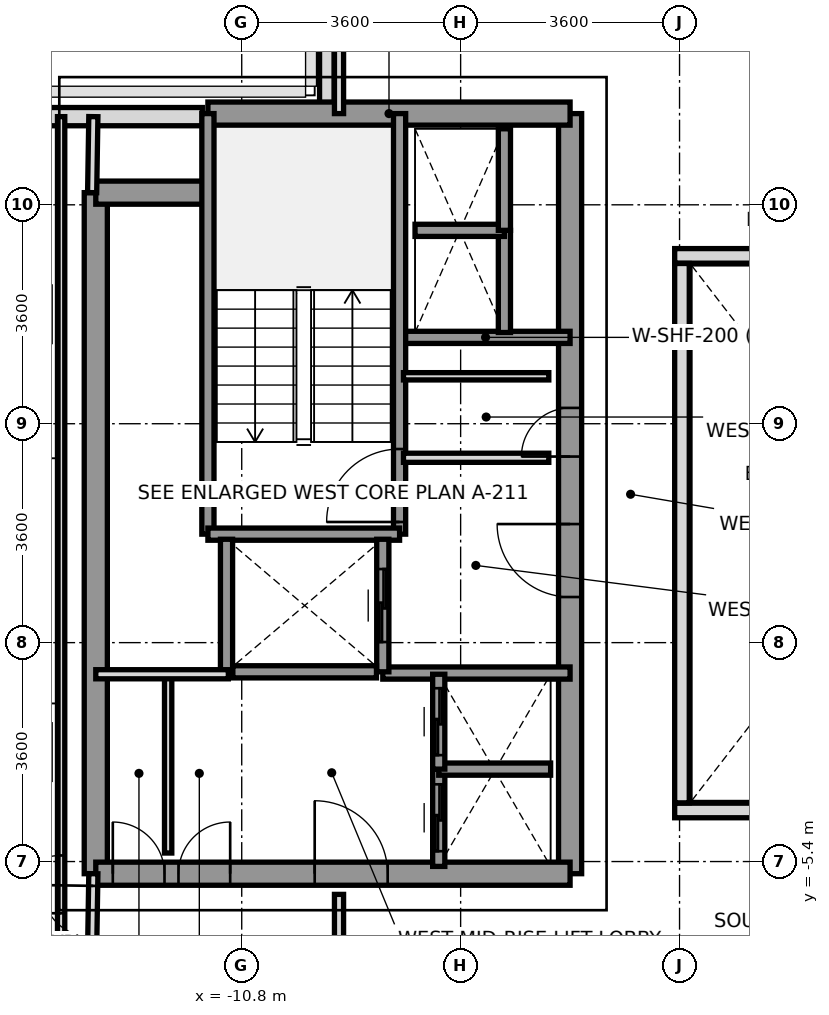
"""IFC4 building model, lengths in metres.
Left out: names, types, materials, properties, quantities, classifications, styles, units other than length and angle.
Written with IfcOpenShell. Run it as: python <this file> out.ifc"""

import sys

from ifc_helpers import new_model, si_unit, direction, frame, frame_2d, origin, place, context, subcontext, project, spatial, rectangle, extrude, source, transform, mapped, element, fill, save


model = new_model("IFC4")
c1 = context("Model", 3, precision=1e-05, world=origin(), true_north=direction((0.0, 1.0)))
c2 = subcontext(c1, "Body", "Model", "MODEL_VIEW")
j1 = project(units=[si_unit("LENGTHUNIT", "METRE"), si_unit("PLANEANGLEUNIT", "RADIAN")], contexts=[c1])
p1 = place(None, origin())
s1 = spatial("IfcSite", under=j1, at=p1, CompositionType="ELEMENT")
p2 = place(p1, origin())
s2 = spatial("IfcBuilding", under=s1, at=p2, CompositionType="ELEMENT")
p3 = place(p2, frame((0.0, 0.0, 160.4)))
s3 = spatial("IfcBuildingStorey", under=s2, at=p3, CompositionType="ELEMENT", Elevation=160.4)
p4 = place(p3, frame((-14.083, 6.85, 0.0), z_axis=(0.0, 0.0, 1.0), x_axis=(1.0, 0.0, 0.0)))
e1 = element("IfcWall", 1, at=p4, inside=s3, PredefinedType="SOLIDWALL", context=c2, shape_type="SweptSolid", body=[
    extrude(rectangle(XDim=2.635, YDim=0.3, at=frame_2d((1.317, 0.0))), origin(), (0.0, 0.0, 1.0), 3.2),
])
p5 = place(p3, frame((-9.4, 6.953, 0.0), z_axis=(0.0, 0.0, 1.0), x_axis=(0.0, 1.0, 0.0)))
e2 = element("IfcWall", 2, at=p5, inside=s3, PredefinedType="PARAPET", context=c2, shape_type="SweptSolid", body=[
    extrude(rectangle(XDim=1.594, YDim=0.24, at=frame_2d((0.797, 0.0))), origin(), (0.0, 0.0, 1.0), 1.15),
])
p6 = place(p3, frame((-13.2, -5.6, 0.0), z_axis=(0.0, 0.0, 1.0), x_axis=(0.0, 1.0, 0.0)))
e3 = element("IfcWall", 3, at=p6, inside=s3, PredefinedType="SHEAR", context=c2, shape_type="SweptSolid", body=[
    extrude(rectangle(XDim=11.2, YDim=0.38, at=frame_2d((5.6, 0.0))), origin(), (0.0, 0.0, 1.0), 3.2),
])
p7 = place(p3, frame((-5.4, -5.6, 0.0), z_axis=(0.0, 0.0, 1.0), x_axis=(0.0, 1.0, 0.0)))
e4 = element("IfcWall", 4, at=p7, inside=s3, PredefinedType="SHEAR", context=c2, shape_type="SweptSolid", body=[
    extrude(rectangle(XDim=12.5, YDim=0.38, at=frame_2d((6.25, 0.0))), origin(), (0.0, 0.0, 1.0), 3.2),
])
p8 = place(p7, frame((4.55, 0.0, 0.0)))
e5 = element("IfcOpeningElement", 5, at=p8, cuts=e4, PredefinedType="OPENING", context=c2, shape_type="SweptSolid", body=[
    extrude(rectangle(XDim=1.2, YDim=2.2, at=frame_2d((0.6, 1.1))), frame((0.0, 0.2, 0.0), z_axis=(0.0, -1.0, 0.0), x_axis=(1.0, 0.0, 0.0)), (0.0, 0.0, 1.0), 0.4),
])
p9 = place(p7, frame((6.86, 0.0, 0.0)))
e6 = element("IfcOpeningElement", 6, at=p9, cuts=e4, PredefinedType="OPENING", context=c2, shape_type="SweptSolid", body=[
    extrude(rectangle(XDim=0.8, YDim=2.1, at=frame_2d((0.4, 1.05))), frame((0.0, 0.2, 0.0), z_axis=(0.0, -1.0, 0.0), x_axis=(1.0, 0.0, 0.0)), (0.0, 0.0, 1.0), 0.4),
])
p10 = place(p3, frame((-11.356, 6.9, 0.0), z_axis=(0.0, 0.0, 1.0), x_axis=(1.0, 0.0, 0.0)))
e7 = element("IfcWall", 7, at=p10, inside=s3, PredefinedType="SHEAR", context=c2, shape_type="SweptSolid", body=[
    extrude(rectangle(XDim=5.956, YDim=0.38, at=frame_2d((2.978, 0.0))), origin(), (0.0, 0.0, 1.0), 3.2),
])
p11 = place(p3, frame((-13.2, 5.6, 0.0), z_axis=(0.0, 0.0, 1.0), x_axis=(1.0, 0.0, 0.0)))
e8 = element("IfcWall", 8, at=p11, inside=s3, PredefinedType="SHEAR", context=c2, shape_type="SweptSolid", body=[
    extrude(rectangle(XDim=1.844, YDim=0.38, at=frame_2d((0.922, 0.0))), origin(), (0.0, 0.0, 1.0), 3.2),
])
p12 = place(p3, frame((-13.2, -5.6, 0.0), z_axis=(0.0, 0.0, 1.0), x_axis=(1.0, 0.0, 0.0)))
e9 = element("IfcWall", 9, at=p12, inside=s3, PredefinedType="SHEAR", context=c2, shape_type="SweptSolid", body=[
    extrude(rectangle(XDim=7.8, YDim=0.38, at=frame_2d((3.9, 0.0))), origin(), (0.0, 0.0, 1.0), 3.2),
])
p13 = place(p12, frame((3.6, 0.0, 0.0)))
e10 = element("IfcOpeningElement", 10, at=p13, cuts=e9, PredefinedType="OPENING", context=c2, shape_type="SweptSolid", body=[
    extrude(rectangle(XDim=1.2, YDim=2.2, at=frame_2d((0.6, 1.1))), frame((0.0, 0.2, 0.0), z_axis=(0.0, -1.0, 0.0), x_axis=(1.0, 0.0, 0.0)), (0.0, 0.0, 1.0), 0.4),
])
p14 = place(p12, frame((0.28, 0.0, 0.0)))
e11 = element("IfcOpeningElement", 11, at=p14, cuts=e9, PredefinedType="OPENING", context=c2, shape_type="SweptSolid", body=[
    extrude(rectangle(XDim=0.85, YDim=2.1, at=frame_2d((0.425, 1.05))), frame((0.0, 0.2, 0.0), z_axis=(0.0, -1.0, 0.0), x_axis=(1.0, 0.0, 0.0)), (0.0, 0.0, 1.0), 0.4),
])
p15 = place(p12, frame((1.36, 0.0, 0.0)))
e12 = element("IfcOpeningElement", 12, at=p15, cuts=e9, PredefinedType="OPENING", context=c2, shape_type="SweptSolid", body=[
    extrude(rectangle(XDim=0.85, YDim=2.1, at=frame_2d((0.425, 1.05))), frame((0.0, 0.2, 0.0), z_axis=(0.0, -1.0, 0.0), x_axis=(1.0, 0.0, 0.0)), (0.0, 0.0, 1.0), 0.4),
])
p16 = place(p3, frame((-8.18, 3.22, 0.0), z_axis=(0.0, 0.0, 1.0), x_axis=(1.0, 0.0, 0.0)))
e13 = element("IfcWall", 13, at=p16, inside=s3, PredefinedType="SOLIDWALL", context=c2, shape_type="SweptSolid", body=[
    extrude(rectangle(XDim=2.78, YDim=0.2, at=frame_2d((1.39, 0.0))), origin(), (0.0, 0.0, 1.0), 3.2),
])
p17 = place(p3, frame((-8.48, -2.3, 0.0), z_axis=(0.0, 0.0, 1.0), x_axis=(1.0, 0.0, 0.0)))
e14 = element("IfcWall", 14, at=p17, inside=s3, PredefinedType="SOLIDWALL", context=c2, shape_type="SweptSolid", body=[
    extrude(rectangle(XDim=3.08, YDim=0.2, at=frame_2d((1.54, 0.0))), origin(), (0.0, 0.0, 1.0), 3.2),
])
p18 = place(p3, frame((-8.204, -0.016, 0.0), z_axis=(0.0, 0.0, 1.0), x_axis=(0.0, 1.0, 0.0)))
e15 = element("IfcWall", 15, at=p18, inside=s3, PredefinedType="SOLIDWALL", context=c2, shape_type="SweptSolid", body=[
    extrude(rectangle(XDim=6.916, YDim=0.2, at=frame_2d((3.458, 0.0))), origin(), (0.0, 0.0, 1.0), 3.2),
])
p19 = place(p18, frame((0.2, 0.0, 0.0)))
e16 = element("IfcOpeningElement", 16, at=p19, cuts=e15, PredefinedType="OPENING", context=c2, shape_type="SweptSolid", body=[
    extrude(rectangle(XDim=1.2, YDim=2.2, at=frame_2d((0.6, 1.1))), frame((0.0, 0.11, 0.0), z_axis=(0.0, -1.0, 0.0), x_axis=(1.0, 0.0, 0.0)), (0.0, 0.0, 1.0), 0.22),
])
p20 = place(p3, frame((-11.356, -0.016, 0.0), z_axis=(0.0, 0.0, 1.0), x_axis=(0.0, 1.0, 0.0)))
e17 = element("IfcWall", 17, at=p20, inside=s3, PredefinedType="SOLIDWALL", context=c2, shape_type="SweptSolid", body=[
    extrude(rectangle(XDim=6.916, YDim=0.2, at=frame_2d((3.458, 0.0))), origin(), (0.0, 0.0, 1.0), 3.2),
])
p21 = place(p3, frame((-11.356, -0.016, 0.0), z_axis=(0.0, 0.0, 1.0), x_axis=(1.0, 0.0, 0.0)))
e18 = element("IfcWall", 18, at=p21, inside=s3, PredefinedType="SOLIDWALL", context=c2, shape_type="SweptSolid", body=[
    extrude(rectangle(XDim=3.152, YDim=0.2, at=frame_2d((1.576, 0.0))), origin(), (0.0, 0.0, 1.0), 3.2),
])
p22 = place(p3, frame((-11.05, -2.28, 0.0), z_axis=(0.0, 0.0, 1.0), x_axis=(0.0, 1.0, 0.0)))
e19 = element("IfcWall", 19, at=p22, inside=s3, PredefinedType="SOLIDWALL", context=c2, shape_type="SweptSolid", body=[
    extrude(rectangle(XDim=2.18, YDim=0.2, at=frame_2d((1.09, 0.0))), origin(), (0.0, 0.0, 1.0), 3.2),
])
p23 = place(p3, frame((-8.48, -2.28, 0.0), z_axis=(0.0, 0.0, 1.0), x_axis=(0.0, 1.0, 0.0)))
e20 = element("IfcWall", 20, at=p23, inside=s3, PredefinedType="SOLIDWALL", context=c2, shape_type="SweptSolid", body=[
    extrude(rectangle(XDim=2.18, YDim=0.2, at=frame_2d((1.09, 0.0))), origin(), (0.0, 0.0, 1.0), 3.2),
])
p24 = place(p23, frame((0.49, 0.0, 0.0)))
e21 = element("IfcOpeningElement", 21, at=p24, cuts=e20, PredefinedType="OPENING", context=c2, shape_type="SweptSolid", body=[
    extrude(rectangle(XDim=1.2, YDim=2.2, at=frame_2d((0.6, 1.1))), frame((0.0, 0.11, 0.0), z_axis=(0.0, -1.0, 0.0), x_axis=(1.0, 0.0, 0.0)), (0.0, 0.0, 1.0), 0.22),
])
p25 = place(p3, frame((-10.946, -2.28, 0.0), z_axis=(0.0, 0.0, 1.0), x_axis=(1.0, 0.0, 0.0)))
e22 = element("IfcWall", 22, at=p25, inside=s3, PredefinedType="SOLIDWALL", context=c2, shape_type="SweptSolid", body=[
    extrude(rectangle(XDim=2.362, YDim=0.2, at=frame_2d((1.181, 0.0))), origin(), (0.0, 0.0, 1.0), 3.2),
])
p26 = place(p3, frame((-7.56, -5.48, 0.0), z_axis=(0.0, 0.0, 1.0), x_axis=(0.0, 1.0, 0.0)))
e23 = element("IfcWall", 23, at=p26, inside=s3, PredefinedType="SOLIDWALL", context=c2, shape_type="SweptSolid", body=[
    extrude(rectangle(XDim=1.6, YDim=0.2, at=frame_2d((0.8, 0.0))), origin(), (0.0, 0.0, 1.0), 3.2),
])
p27 = place(p26, frame((0.25, 0.0, 0.0)))
e24 = element("IfcOpeningElement", 24, at=p27, cuts=e23, PredefinedType="OPENING", context=c2, shape_type="SweptSolid", body=[
    extrude(rectangle(XDim=1.1, YDim=2.2, at=frame_2d((0.55, 1.1))), frame((0.0, 0.11, 0.0), z_axis=(0.0, -1.0, 0.0), x_axis=(1.0, 0.0, 0.0)), (0.0, 0.0, 1.0), 0.22),
])
p28 = place(p3, frame((-7.56, -3.88, 0.0), z_axis=(0.0, 0.0, 1.0), x_axis=(1.0, 0.0, 0.0)))
e25 = element("IfcWall", 25, at=p28, inside=s3, PredefinedType="SOLIDWALL", context=c2, shape_type="SweptSolid", body=[
    extrude(rectangle(XDim=1.84, YDim=0.2, at=frame_2d((0.92, 0.0))), origin(), (0.0, 0.0, 1.0), 3.2),
])
p29 = place(p3, frame((-7.56, -3.88, 0.0), z_axis=(0.0, 0.0, 1.0), x_axis=(0.0, 1.0, 0.0)))
e26 = element("IfcWall", 26, at=p29, inside=s3, PredefinedType="SOLIDWALL", context=c2, shape_type="SweptSolid", body=[
    extrude(rectangle(XDim=1.56, YDim=0.2, at=frame_2d((0.78, 0.0))), origin(), (0.0, 0.0, 1.0), 3.2),
])
p30 = place(p29, frame((0.23, 0.0, 0.0)))
e27 = element("IfcOpeningElement", 27, at=p30, cuts=e26, PredefinedType="OPENING", context=c2, shape_type="SweptSolid", body=[
    extrude(rectangle(XDim=1.1, YDim=2.2, at=frame_2d((0.55, 1.1))), frame((0.0, 0.11, 0.0), z_axis=(0.0, -1.0, 0.0), x_axis=(1.0, 0.0, 0.0)), (0.0, 0.0, 1.0), 0.22),
])
p31 = place(p3, frame((-6.48, 3.3, 0.0), z_axis=(0.0, 0.0, 1.0), x_axis=(0.0, 1.0, 0.0)))
e28 = element("IfcWall", 28, at=p31, inside=s3, PredefinedType="SOLIDWALL", context=c2, shape_type="SweptSolid", body=[
    extrude(rectangle(XDim=1.68, YDim=0.2, at=frame_2d((0.84, 0.0))), origin(), (0.0, 0.0, 1.0), 3.2),
])
p32 = place(p3, frame((-7.95, 4.98, 0.0), z_axis=(0.0, 0.0, 1.0), x_axis=(1.0, 0.0, 0.0)))
e29 = element("IfcWall", 29, at=p32, inside=s3, PredefinedType="SOLIDWALL", context=c2, shape_type="SweptSolid", body=[
    extrude(rectangle(XDim=1.47, YDim=0.2, at=frame_2d((0.735, 0.0))), origin(), (0.0, 0.0, 1.0), 3.2),
])
p33 = place(p3, frame((-6.48, 4.98, 0.0), z_axis=(0.0, 0.0, 1.0), x_axis=(0.0, 1.0, 0.0)))
e30 = element("IfcWall", 30, at=p33, inside=s3, PredefinedType="SOLIDWALL", context=c2, shape_type="SweptSolid", body=[
    extrude(rectangle(XDim=1.67, YDim=0.2, at=frame_2d((0.835, 0.0))), origin(), (0.0, 0.0, 1.0), 3.2),
])
p34 = place(p3, frame((-8.14, 1.24, 0.0), z_axis=(0.0, 0.0, 1.0), x_axis=(1.0, 0.0, 0.0)))
e31 = element("IfcWall", 31, at=p34, inside=s3, PredefinedType="PARTITIONING", context=c2, shape_type="SweptSolid", body=[
    extrude(rectangle(XDim=2.39, YDim=0.15, at=frame_2d((1.195, 0.0))), origin(), (0.0, 0.0, 1.0), 2.3),
])
p35 = place(p3, frame((-8.14, 2.58, 0.0), z_axis=(0.0, 0.0, 1.0), x_axis=(1.0, 0.0, 0.0)))
e32 = element("IfcWall", 32, at=p35, inside=s3, PredefinedType="PARTITIONING", context=c2, shape_type="SweptSolid", body=[
    extrude(rectangle(XDim=2.39, YDim=0.12, at=frame_2d((1.195, 0.0))), origin(), (0.0, 0.0, 1.0), 2.3),
])
p36 = place(p3, frame((-12.01, -5.26, 0.0), z_axis=(0.0, 0.0, 1.0), x_axis=(0.0, 1.0, 0.0)))
e33 = element("IfcWall", 33, at=p36, inside=s3, PredefinedType="PARTITIONING", context=c2, shape_type="SweptSolid", body=[
    extrude(rectangle(XDim=2.94, YDim=0.12, at=frame_2d((1.47, 0.0))), origin(), (0.0, 0.0, 1.0), 3.2),
])
p37 = place(p3, frame((-13.2, -2.32, 0.0), z_axis=(0.0, 0.0, 1.0), x_axis=(1.0, 0.0, 0.0)))
e34 = element("IfcWall", 34, at=p37, inside=s3, PredefinedType="PARTITIONING", context=c2, shape_type="SweptSolid", body=[
    extrude(rectangle(XDim=2.18, YDim=0.15, at=frame_2d((1.09, 0.0))), origin(), (0.0, 0.0, 1.0), 3.2),
])
p38 = place(p3, frame((-9.2, 6.9, 0.0), z_axis=(0.0, 0.0, 1.0), x_axis=(0.0, 1.0, 0.0)))
e35 = element("IfcWall", 35, at=p38, inside=s3, PredefinedType="PARTITIONING", context=c2, shape_type="SweptSolid", body=[
    extrude(rectangle(XDim=8.78, YDim=0.15, at=frame_2d((4.39, 0.0))), origin(), (0.0, 0.0, 1.0), 2.75),
])
p39 = place(p3, frame((-9.2, -15.68, 0.0), z_axis=(0.0, 0.0, 1.0), x_axis=(0.0, 1.0, 0.0)))
e36 = element("IfcWall", 36, at=p39, inside=s3, PredefinedType="PARTITIONING", context=c2, shape_type="SweptSolid", body=[
    extrude(rectangle(XDim=9.74, YDim=0.15, at=frame_2d((4.87, 0.0))), origin(), (0.0, 0.0, 1.0), 2.75),
])
p40 = place(p3, frame((-13.26, 5.6, 0.0), z_axis=(0.0, 0.0, 1.0), x_axis=(0.016013571389, 0.999871774545, 0.0)))
e37 = element("IfcWall", 37, at=p40, inside=s3, PredefinedType="PARTITIONING", context=c2, shape_type="SweptSolid", body=[
    extrude(rectangle(XDim=1.25, YDim=0.15, at=frame_2d((0.625, 0.0))), origin(), (0.0, 0.0, 1.0), 3.2),
])
p41 = place(p3, frame((-13.26, -6.85, 0.0), z_axis=(0.0, 0.0, 1.0), x_axis=(0.016013571389, 0.999871774545, 0.0)))
e38 = element("IfcWall", 38, at=p41, inside=s3, PredefinedType="PARTITIONING", context=c2, shape_type="SweptSolid", body=[
    extrude(rectangle(XDim=1.25, YDim=0.15, at=frame_2d((0.625, 0.0))), origin(), (0.0, 0.0, 1.0), 3.2),
])
p42 = place(p41, frame((0.2, 0.0, 0.0)))
e39 = element("IfcOpeningElement", 39, at=p42, cuts=e38, PredefinedType="OPENING", context=c2, shape_type="SweptSolid", body=[
    extrude(rectangle(XDim=0.85, YDim=2.1, at=frame_2d((0.425, 1.05))), frame((0.0, 0.085, 0.0), z_axis=(0.0, -1.0, 0.0), x_axis=(1.0, 0.0, 0.0)), (0.0, 0.0, 1.0), 0.17),
])
p43 = place(p3, frame((-13.77, -6.85, 0.0), z_axis=(0.0, 0.0, 1.0), x_axis=(0.0, 1.0, 0.0)))
e40 = element("IfcWall", 40, at=p43, inside=s3, PredefinedType="PARTITIONING", context=c2, shape_type="SweptSolid", body=[
    extrude(rectangle(XDim=13.7, YDim=0.12, at=frame_2d((6.85, 0.0))), origin(), (0.0, 0.0, 1.0), 2.87),
])
p44 = place(p43, frame((0.6, 0.0, 0.0)))
e41 = element("IfcOpeningElement", 41, at=p44, cuts=e40, PredefinedType="OPENING", context=c2, shape_type="SweptSolid", body=[
    extrude(rectangle(XDim=0.95, YDim=2.15, at=frame_2d((0.475, 1.075))), frame((0.0, 0.07, 0.0), z_axis=(0.0, -1.0, 0.0), x_axis=(1.0, 0.0, 0.0)), (0.0, 0.0, 1.0), 0.14),
])
for number, where, z_axis, x_axis in (
    (42, (-3.68, -4.56, 0.0), (0.0, 0.0, 1.0), (1.0, 0.0, 0.0)),
    (43, (-3.68, 4.56, 0.0), (0.0, 0.0, 1.0), (1.0, 0.0, 0.0)),
):
    element("IfcWall", number, at=place(p3, frame(where, z_axis=z_axis, x_axis=x_axis)), inside=s3, PredefinedType="PARAPET", context=c2, shape_type="SweptSolid", body=[
        extrude(rectangle(XDim=7.36, YDim=0.24, at=frame_2d((3.68, 0.0))), origin(), (0.0, 0.0, 1.0), 1.15),
    ])
p45 = place(p3, frame((-3.56, -4.435, 0.0), z_axis=(0.0, 0.0, 1.0), x_axis=(0.0, 1.0, 0.0)))
e44 = element("IfcWall", 44, at=p45, inside=s3, PredefinedType="PARAPET", context=c2, shape_type="SweptSolid", body=[
    extrude(rectangle(XDim=8.87, YDim=0.24, at=frame_2d((4.435, 0.0))), origin(), (0.0, 0.0, 1.0), 1.15),
])
m1 = source(origin(), c2, "Body", "SweptSolid", [
    extrude(rectangle(XDim=1.2, YDim=2.2, at=frame_2d((0.6, 1.1))), frame((0.0, 0.025, 0.0), z_axis=(0.0, -1.0, 0.0), x_axis=(1.0, 0.0, 0.0)), (0.0, 0.0, 1.0), 0.05),
])
p46 = place(p19, origin())
e45 = element("IfcDoor", 45, at=p46, inside=s3, OperationType="SINGLE_SWING_LEFT", PredefinedType="DOOR", context=c2, shape_type="MappedRepresentation", body=[
    mapped(m1, transform((0.0, 0.0, 0.0), x_axis=(1.0, 0.0, 0.0), y_axis=(0.0, 1.0, 0.0), z_axis=(0.0, 0.0, 1.0), scale=1.0)),
])
fill(e16, e45)
p47 = place(p8, origin())
e46 = element("IfcDoor", 46, at=p47, inside=s3, OperationType="SINGLE_SWING_RIGHT", PredefinedType="DOOR", context=c2, shape_type="MappedRepresentation", body=[
    mapped(m1, transform((0.0, 0.0, 0.0), x_axis=(1.0, 0.0, 0.0), y_axis=(0.0, 1.0, 0.0), z_axis=(0.0, 0.0, 1.0), scale=1.0)),
])
fill(e5, e46)
p48 = place(p13, origin())
e47 = element("IfcDoor", 47, at=p48, inside=s3, OperationType="SINGLE_SWING_LEFT", PredefinedType="DOOR", context=c2, shape_type="MappedRepresentation", body=[
    mapped(m1, transform((0.0, 0.0, 0.0), x_axis=(1.0, 0.0, 0.0), y_axis=(0.0, 1.0, 0.0), z_axis=(0.0, 0.0, 1.0), scale=1.0)),
])
fill(e10, e47)
m2 = source(origin(), c2, "Body", "SweptSolid", [
    extrude(rectangle(XDim=0.8, YDim=2.1, at=frame_2d((0.4, 1.05))), frame((0.0, 0.025, 0.0), z_axis=(0.0, -1.0, 0.0), x_axis=(1.0, 0.0, 0.0)), (0.0, 0.0, 1.0), 0.05),
])
p49 = place(p9, origin())
e48 = element("IfcDoor", 48, at=p49, inside=s3, OperationType="SINGLE_SWING_LEFT", PredefinedType="DOOR", context=c2, shape_type="MappedRepresentation", body=[
    mapped(m2, transform((0.0, 0.0, 0.0), x_axis=(1.0, 0.0, 0.0), y_axis=(0.0, 1.0, 0.0), z_axis=(0.0, 0.0, 1.0), scale=1.0)),
])
fill(e6, e48)
m3 = source(origin(), c2, "Body", "SweptSolid", [
    extrude(rectangle(XDim=0.85, YDim=2.1, at=frame_2d((0.425, 1.05))), frame((0.0, 0.025, 0.0), z_axis=(0.0, -1.0, 0.0), x_axis=(1.0, 0.0, 0.0)), (0.0, 0.0, 1.0), 0.05),
])
p50 = place(p14, origin())
e49 = element("IfcDoor", 49, at=p50, inside=s3, OperationType="SINGLE_SWING_LEFT", PredefinedType="DOOR", context=c2, shape_type="MappedRepresentation", body=[
    mapped(m3, transform((0.0, 0.0, 0.0), x_axis=(1.0, 0.0, 0.0), y_axis=(0.0, 1.0, 0.0), z_axis=(0.0, 0.0, 1.0), scale=1.0)),
])
fill(e11, e49)
p51 = place(p15, origin())
e50 = element("IfcDoor", 50, at=p51, inside=s3, OperationType="SINGLE_SWING_RIGHT", PredefinedType="DOOR", context=c2, shape_type="MappedRepresentation", body=[
    mapped(m3, transform((0.0, 0.0, 0.0), x_axis=(1.0, 0.0, 0.0), y_axis=(0.0, 1.0, 0.0), z_axis=(0.0, 0.0, 1.0), scale=1.0)),
])
fill(e12, e50)
p52 = place(p24, origin())
e51 = element("IfcDoor", 51, at=p52, inside=s3, OperationType="SLIDING_TO_RIGHT", PredefinedType="DOOR", context=c2, shape_type="MappedRepresentation", body=[
    mapped(m1, transform((0.0, 0.0, 0.0), x_axis=(1.0, 0.0, 0.0), y_axis=(0.0, 1.0, 0.0), z_axis=(0.0, 0.0, 1.0), scale=1.0)),
])
fill(e21, e51)
m4 = source(origin(), c2, "Body", "SweptSolid", [
    extrude(rectangle(XDim=1.1, YDim=2.2, at=frame_2d((0.55, 1.1))), frame((0.0, 0.025, 0.0), z_axis=(0.0, -1.0, 0.0), x_axis=(1.0, 0.0, 0.0)), (0.0, 0.0, 1.0), 0.05),
])
p53 = place(p27, origin())
e52 = element("IfcDoor", 52, at=p53, inside=s3, OperationType="SLIDING_TO_LEFT", PredefinedType="DOOR", context=c2, shape_type="MappedRepresentation", body=[
    mapped(m4, transform((0.0, 0.0, 0.0), x_axis=(1.0, 0.0, 0.0), y_axis=(0.0, 1.0, 0.0), z_axis=(0.0, 0.0, 1.0), scale=1.0)),
])
fill(e24, e52)
p54 = place(p30, origin())
e53 = element("IfcDoor", 53, at=p54, inside=s3, OperationType="SLIDING_TO_LEFT", PredefinedType="DOOR", context=c2, shape_type="MappedRepresentation", body=[
    mapped(m4, transform((0.0, 0.0, 0.0), x_axis=(1.0, 0.0, 0.0), y_axis=(0.0, 1.0, 0.0), z_axis=(0.0, 0.0, 1.0), scale=1.0)),
])
fill(e27, e53)
m5 = source(origin(), c2, "Body", "SweptSolid", [
    extrude(rectangle(XDim=0.95, YDim=2.15, at=frame_2d((0.475, 1.075))), frame((0.0, 0.025, 0.0), z_axis=(0.0, -1.0, 0.0), x_axis=(1.0, 0.0, 0.0)), (0.0, 0.0, 1.0), 0.05),
])
p55 = place(p44, origin())
e54 = element("IfcDoor", 54, at=p55, inside=s3, OperationType="SINGLE_SWING_LEFT", PredefinedType="DOOR", context=c2, shape_type="MappedRepresentation", body=[
    mapped(m5, transform((0.0, 0.0, 0.0), x_axis=(1.0, 0.0, 0.0), y_axis=(0.0, 1.0, 0.0), z_axis=(0.0, 0.0, 1.0), scale=1.0)),
])
fill(e41, e54)
p56 = place(p42, origin())
e55 = element("IfcDoor", 55, at=p56, inside=s3, OperationType="SINGLE_SWING_RIGHT", PredefinedType="DOOR", context=c2, shape_type="MappedRepresentation", body=[
    mapped(m3, transform((0.0, 0.0, 0.0), x_axis=(1.0, 0.0, 0.0), y_axis=(0.0, 1.0, 0.0), z_axis=(0.0, 0.0, 1.0), scale=1.0)),
])
fill(e39, e55)
save(model, sys.argv[1])
